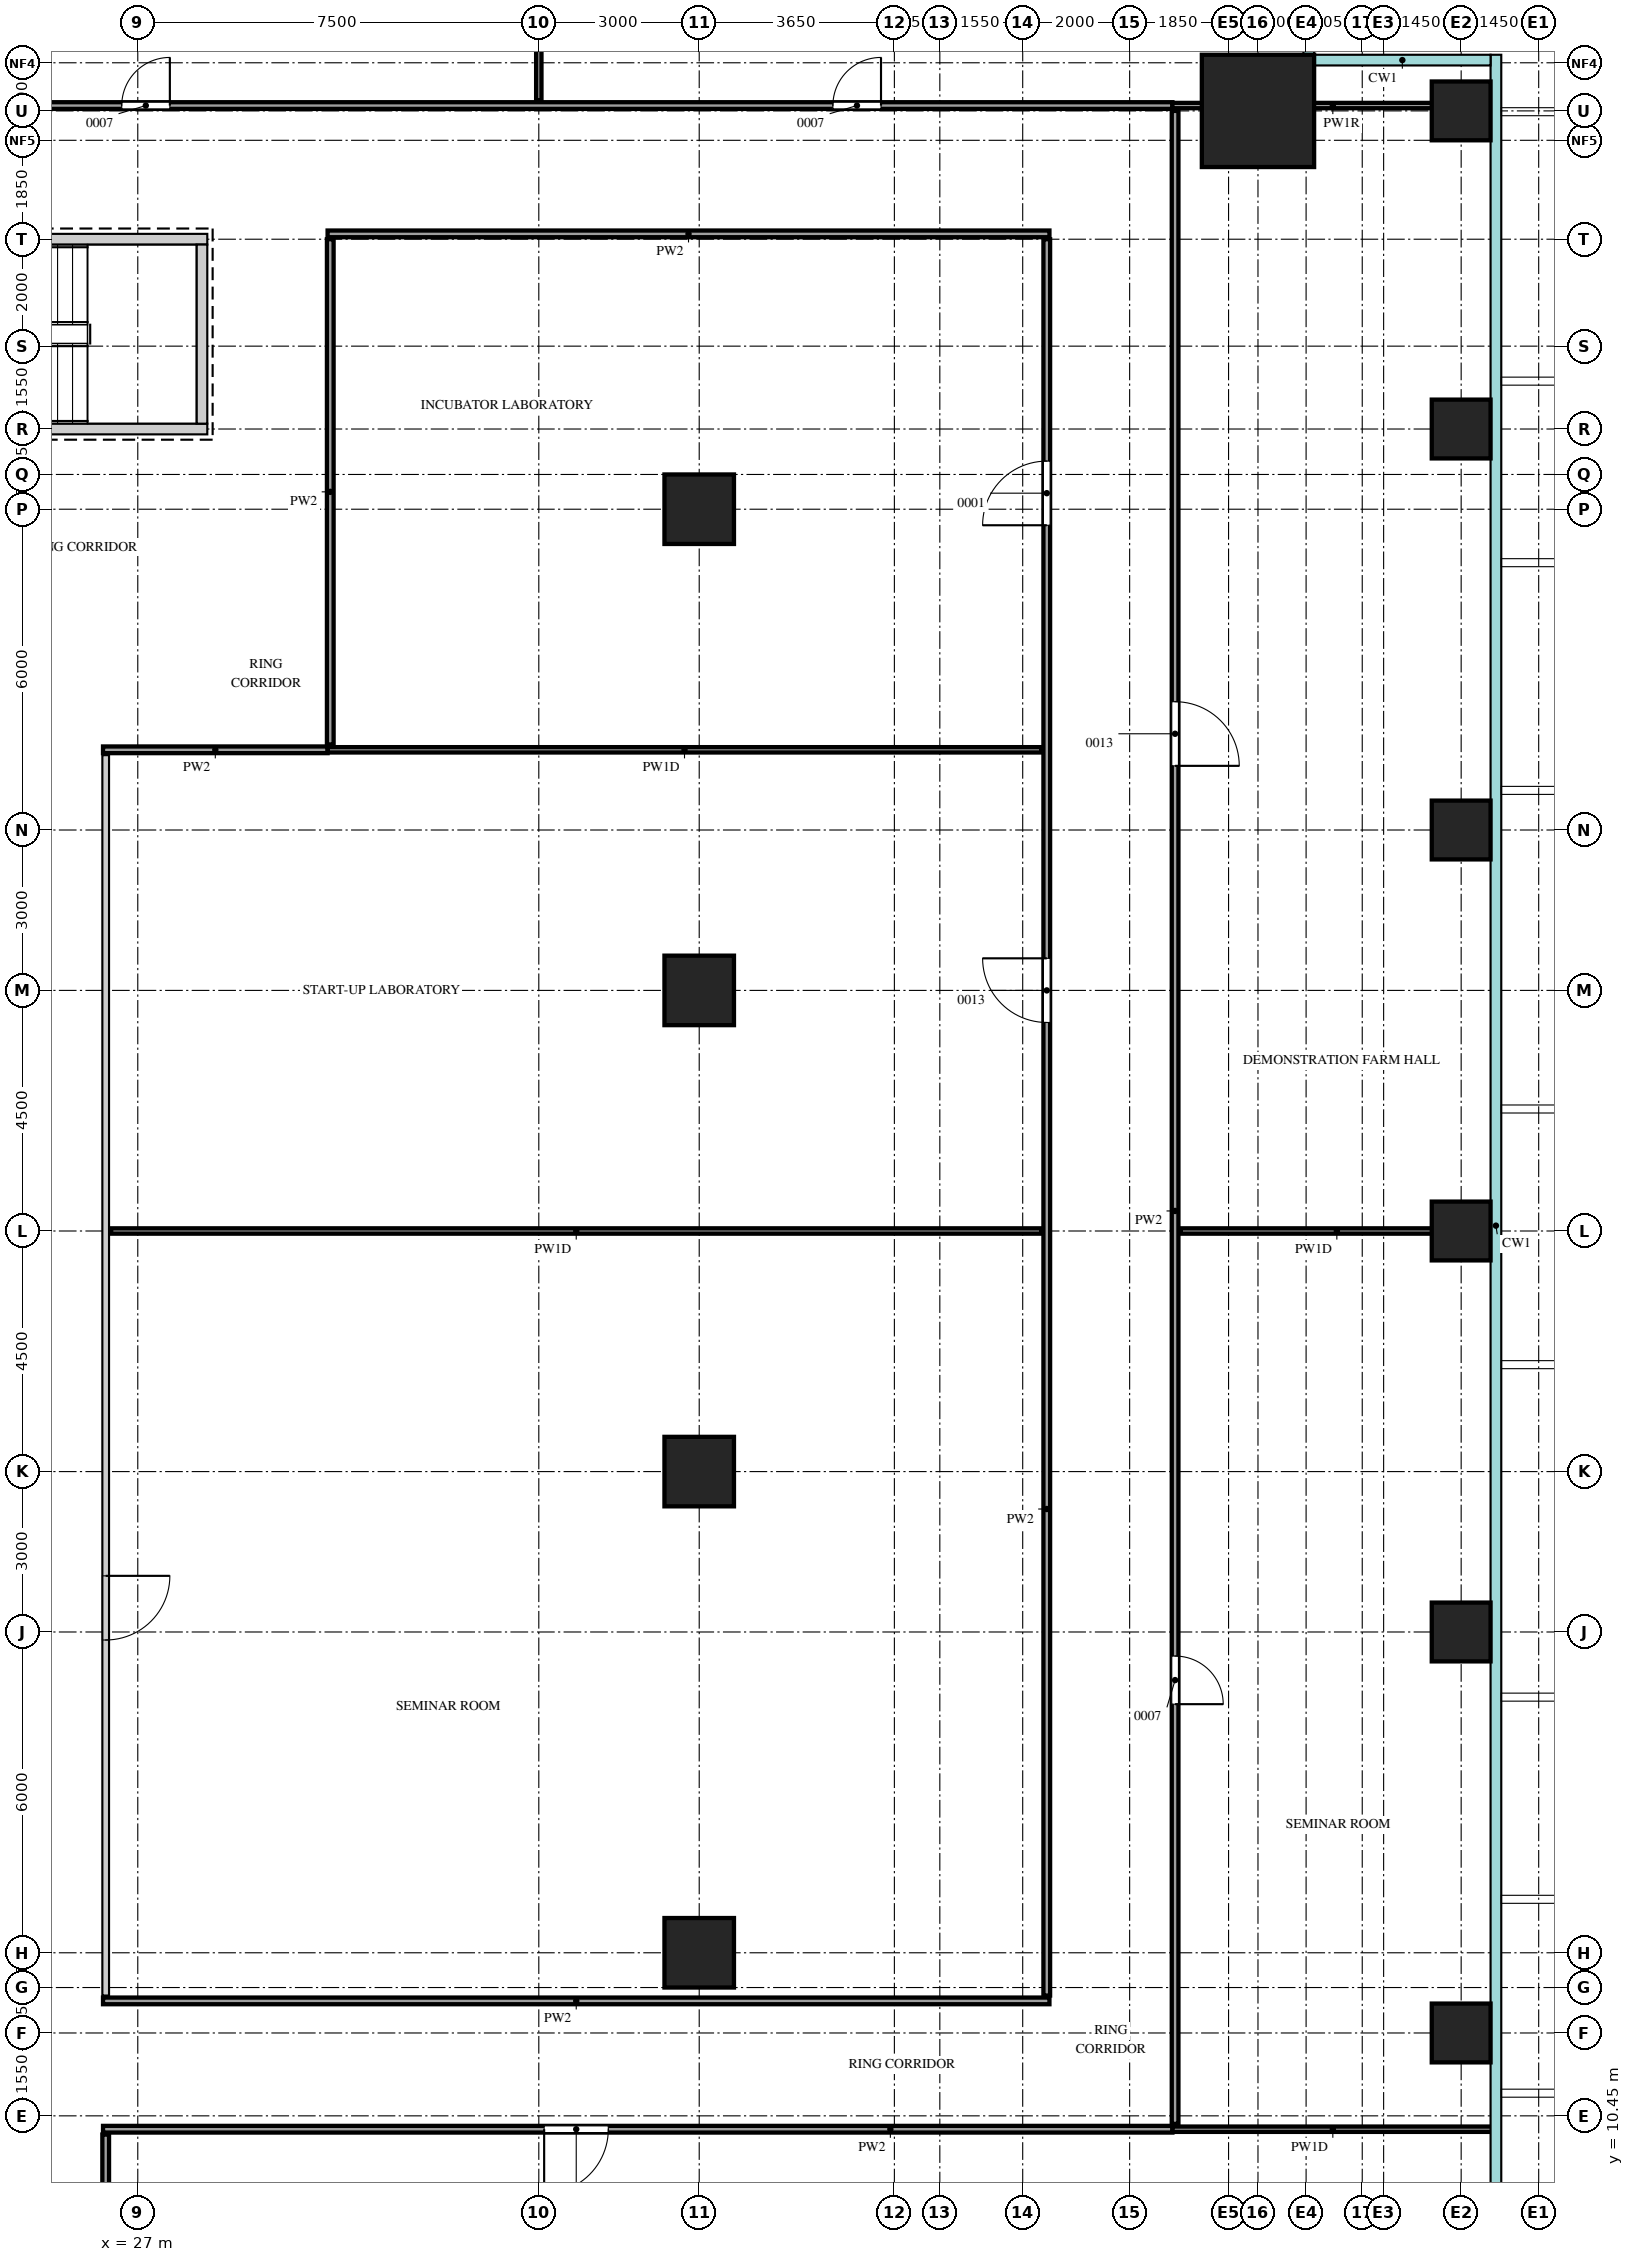
"""IFC4 building model, lengths in metres.
Left out: names, types, materials, properties, quantities, classifications, styles, units other than length and angle.
Written with IfcOpenShell. Run it as: python <this file> out.ifc"""

import sys

from ifc_helpers import new_model, si_unit, direction, frame, frame_2d, origin, origin_2d, place, context, subcontext, project, spatial, rectangle, extrude, source, transform, mapped, element, fill, save


model = new_model("IFC4")
c1 = context("Model", 3, precision=1e-05, world=origin(), true_north=direction((0.0, 1.0)))
c2 = subcontext(c1, "Body", "Model", "MODEL_VIEW")
j1 = project(units=[si_unit("LENGTHUNIT", "METRE"), si_unit("PLANEANGLEUNIT", "RADIAN")], contexts=[c1])
p1 = place(None, origin())
s1 = spatial("IfcSite", under=j1, at=p1, CompositionType="ELEMENT")
p2 = place(p1, origin())
s2 = spatial("IfcBuilding", under=s1, at=p2, CompositionType="ELEMENT")
p3 = place(p2, frame((0.0, 0.0, 154.3)))
s3 = spatial("IfcBuildingStorey", under=s2, at=p3, CompositionType="ELEMENT", Elevation=154.3)
m1 = source(origin(), c2, "Body", "SweptSolid", [
    extrude(rectangle(XDim=7.1, YDim=0.2, at=frame_2d((3.55, 0.0))), origin(), (0.0, 0.0, 1.0), 4.1),
])
p4 = place(p3, frame((21.2, 45.55, 0.0), z_axis=(0.0, 0.0, 1.0), x_axis=(1.0, 0.0, 0.0)))
e1 = element("IfcWall", 1, at=p4, inside=s3, PredefinedType="SHEAR", context=c2, shape_type="MappedRepresentation", body=[
    mapped(m1, transform((0.0, 0.0, 0.0))),
])
m2 = source(origin(), c2, "Body", "SweptSolid", [
    extrude(rectangle(XDim=1.2, YDim=2.1, at=frame_2d((0.6, 1.05))), frame((0.0, 0.11, 0.0), z_axis=(0.0, -1.0, 0.0), x_axis=(1.0, 0.0, 0.0)), (0.0, 0.0, 1.0), 0.22),
])
p5 = place(p4, frame((0.15, 0.0, 0.0)))
e2 = element("IfcOpeningElement", 2, at=p5, cuts=e1, PredefinedType="OPENING", context=c2, shape_type="MappedRepresentation", body=[
    mapped(m2, transform((0.0, 0.0, 0.0))),
])
p6 = place(p3, frame((21.2, 42.0, 0.0), z_axis=(0.0, 0.0, 1.0), x_axis=(1.0, 0.0, 0.0)))
e3 = element("IfcWall", 3, at=p6, inside=s3, PredefinedType="SHEAR", context=c2, shape_type="MappedRepresentation", body=[
    mapped(m1, transform((0.0, 0.0, 0.0))),
])
m3 = source(origin(), c2, "Body", "SweptSolid", [
    extrude(rectangle(XDim=3.35, YDim=0.2, at=frame_2d((1.675, 0.0))), origin(), (0.0, 0.0, 1.0), 4.1),
])
p7 = place(p3, frame((28.2, 42.1, 0.0), z_axis=(0.0, 0.0, 1.0), x_axis=(0.0, 1.0, 0.0)))
e4 = element("IfcWall", 4, at=p7, inside=s3, PredefinedType="SHEAR", context=c2, shape_type="MappedRepresentation", body=[
    mapped(m3, transform((0.0, 0.0, 0.0))),
])
m4 = source(origin(), c2, "Body", "SweptSolid", [
    extrude(rectangle(XDim=2.1, YDim=2.1, at=origin_2d()), origin(), (0.0, 0.0, 1.0), 4.4),
])
p8 = place(p3, frame((47.95, 47.95, 0.0), z_axis=(0.0, 0.0, 1.0), x_axis=(1.0, 0.0, 0.0)))
e5 = element("IfcColumn", 5, at=p8, inside=s3, PredefinedType="COLUMN", context=c2, shape_type="MappedRepresentation", body=[
    mapped(m4, transform((0.0, 0.0, 0.0))),
])
m5 = source(origin(), c2, "Body", "SweptSolid", [
    extrude(rectangle(XDim=1.1, YDim=1.1, at=origin_2d()), origin(), (0.0, 0.0, 1.0), 4.4),
])
for number, where, z_axis, x_axis in (
    (6, (51.75, 12.0, 0.0), (0.0, 0.0, 1.0), (1.0, 0.0, 0.0)),
    (7, (51.75, 19.5, 0.0), (0.0, 0.0, 1.0), (1.0, 0.0, 0.0)),
    (8, (51.75, 27.0, 0.0), (0.0, 0.0, 1.0), (1.0, 0.0, 0.0)),
    (9, (51.75, 34.5, 0.0), (0.0, 0.0, 1.0), (1.0, 0.0, 0.0)),
    (10, (51.75, 42.0, 0.0), (0.0, 0.0, 1.0), (1.0, 0.0, 0.0)),
    (11, (51.75, 47.95, 0.0), (0.0, 0.0, 1.0), (1.0, 0.0, 0.0)),
):
    element("IfcColumn", number, at=place(p3, frame(where, z_axis=z_axis, x_axis=x_axis)), inside=s3, PredefinedType="COLUMN", context=c2, shape_type="MappedRepresentation", body=[
        mapped(m5, transform((0.0, 0.0, 0.0))),
    ])
m6 = source(origin(), c2, "Body", "SweptSolid", [
    extrude(rectangle(XDim=1.3, YDim=1.3, at=origin_2d()), origin(), (0.0, 0.0, 1.0), 4.4),
])
for number, where, z_axis, x_axis in (
    (12, (37.5, 13.5, 0.0), (0.0, 0.0, 1.0), (1.0, 0.0, 0.0)),
    (13, (37.5, 22.5, 0.0), (0.0, 0.0, 1.0), (1.0, 0.0, 0.0)),
    (14, (37.5, 31.5, 0.0), (0.0, 0.0, 1.0), (1.0, 0.0, 0.0)),
    (15, (37.5, 40.5, 0.0), (0.0, 0.0, 1.0), (1.0, 0.0, 0.0)),
):
    element("IfcColumn", number, at=place(p3, frame(where, z_axis=z_axis, x_axis=x_axis)), inside=s3, PredefinedType="COLUMN", context=c2, shape_type="MappedRepresentation", body=[
        mapped(m6, transform((0.0, 0.0, 0.0))),
    ])
m7 = source(origin(), c2, "Body", "SweptSolid", [
    extrude(rectangle(XDim=3.95, YDim=0.125, at=frame_2d((1.975, 0.0))), origin(), (0.0, 0.0, 1.0), 4.2),
])
p9 = place(p3, frame((26.4, 6.15, 0.0), z_axis=(0.0, 0.0, 1.0), x_axis=(0.0, 1.0, 0.0)))
e16 = element("IfcWall", 16, at=p9, inside=s3, PredefinedType="PARTITIONING", context=c2, shape_type="MappedRepresentation", body=[
    mapped(m7, transform((0.0, 0.0, 0.0))),
])
m8 = source(origin(), c2, "Body", "SweptSolid", [
    extrude(rectangle(XDim=20.0, YDim=0.125, at=frame_2d((10.0, 0.0))), origin(), (0.0, 0.0, 1.0), 4.2),
])
p10 = place(p3, frame((26.35, 10.2, 0.0), z_axis=(0.0, 0.0, 1.0), x_axis=(1.0, 0.0, 0.0)))
e17 = element("IfcWall", 17, at=p10, inside=s3, PredefinedType="PARTITIONING", context=c2, shape_type="MappedRepresentation", body=[
    mapped(m8, transform((0.0, 0.0, 0.0))),
])
m9 = source(origin(), c2, "Body", "SweptSolid", [
    extrude(rectangle(XDim=1.2, YDim=2.1, at=frame_2d((0.6, 1.05))), frame((0.0, 0.073, 0.0), z_axis=(0.0, -1.0, 0.0), x_axis=(1.0, 0.0, 0.0)), (0.0, 0.0, 1.0), 0.145),
])
p11 = place(p10, frame((8.25, 0.0, 0.0)))
e18 = element("IfcOpeningElement", 18, at=p11, cuts=e17, PredefinedType="OPENING", context=c2, shape_type="MappedRepresentation", body=[
    mapped(m9, transform((0.0, 0.0, 0.0))),
])
m10 = source(origin(), c2, "Body", "SweptSolid", [
    extrude(rectangle(XDim=6.0, YDim=0.1, at=frame_2d((3.0, 0.0))), origin(), (0.0, 0.0, 1.0), 4.2),
])
p12 = place(p3, frame((46.35, 10.2, 0.0), z_axis=(0.0, 0.0, 1.0), x_axis=(1.0, 0.0, 0.0)))
e19 = element("IfcWall", 19, at=p12, inside=s3, PredefinedType="PARTITIONING", context=c2, shape_type="MappedRepresentation", body=[
    mapped(m10, transform((0.0, 0.0, 0.0))),
])
m11 = source(origin(), c2, "Body", "SweptSolid", [
    extrude(rectangle(XDim=37.65, YDim=0.125, at=frame_2d((18.825, 0.0))), origin(), (0.0, 0.0, 1.0), 4.2),
])
p13 = place(p3, frame((46.4, 10.3, 0.0), z_axis=(0.0, 0.0, 1.0), x_axis=(0.0, 1.0, 0.0)))
e20 = element("IfcWall", 20, at=p13, inside=s3, PredefinedType="PARTITIONING", context=c2, shape_type="MappedRepresentation", body=[
    mapped(m11, transform((0.0, 0.0, 0.0))),
])
m12 = source(origin(), c2, "Body", "SweptSolid", [
    extrude(rectangle(XDim=0.9, YDim=2.1, at=frame_2d((0.45, 1.05))), frame((0.0, 0.073, 0.0), z_axis=(0.0, -1.0, 0.0), x_axis=(1.0, 0.0, 0.0)), (0.0, 0.0, 1.0), 0.145),
])
p14 = place(p13, frame((7.85, 0.0, 0.0)))
e21 = element("IfcOpeningElement", 21, at=p14, cuts=e20, PredefinedType="OPENING", context=c2, shape_type="MappedRepresentation", body=[
    mapped(m12, transform((0.0, 0.0, 0.0))),
])
p15 = place(p13, frame((25.4, 0.0, 0.0)))
e22 = element("IfcOpeningElement", 22, at=p15, cuts=e20, PredefinedType="OPENING", context=c2, shape_type="MappedRepresentation", body=[
    mapped(m9, transform((0.0, 0.0, 0.0))),
])
m13 = source(origin(), c2, "Body", "SweptSolid", [
    extrude(rectangle(XDim=17.7, YDim=0.125, at=frame_2d((8.85, 0.0))), origin(), (0.0, 0.0, 1.0), 4.2),
])
p16 = place(p3, frame((26.35, 12.6, 0.0), z_axis=(0.0, 0.0, 1.0), x_axis=(1.0, 0.0, 0.0)))
e23 = element("IfcWall", 23, at=p16, inside=s3, PredefinedType="PARTITIONING", context=c2, shape_type="MappedRepresentation", body=[
    mapped(m13, transform((0.0, 0.0, 0.0))),
])
m14 = source(origin(), c2, "Body", "SweptSolid", [
    extrude(rectangle(XDim=23.2, YDim=0.125, at=frame_2d((11.6, 0.0))), origin(), (0.0, 0.0, 1.0), 4.2),
])
p17 = place(p3, frame((26.4, 12.7, 0.0), z_axis=(0.0, 0.0, 1.0), x_axis=(0.0, 1.0, 0.0)))
e24 = element("IfcWall", 24, at=p17, inside=s3, PredefinedType="PARTITIONING", context=c2, shape_type="MappedRepresentation", body=[
    mapped(m14, transform((0.0, 0.0, 0.0))),
])
p18 = place(p17, frame((6.65, 0.0, 0.0)))
e25 = element("IfcOpeningElement", 25, at=p18, cuts=e24, PredefinedType="OPENING", context=c2, shape_type="MappedRepresentation", body=[
    mapped(m9, transform((0.0, 0.0, 0.0))),
])
m15 = source(origin(), c2, "Body", "SweptSolid", [
    extrude(rectangle(XDim=32.85, YDim=0.125, at=frame_2d((16.425, 0.0))), origin(), (0.0, 0.0, 1.0), 4.2),
])
p19 = place(p3, frame((44.0, 12.7, 0.0), z_axis=(0.0, 0.0, 1.0), x_axis=(0.0, 1.0, 0.0)))
e26 = element("IfcWall", 26, at=p19, inside=s3, PredefinedType="PARTITIONING", context=c2, shape_type="MappedRepresentation", body=[
    mapped(m15, transform((0.0, 0.0, 0.0))),
])
p20 = place(p19, frame((18.2, 0.0, 0.0)))
e27 = element("IfcOpeningElement", 27, at=p20, cuts=e26, PredefinedType="OPENING", context=c2, shape_type="MappedRepresentation", body=[
    mapped(m9, transform((0.0, 0.0, 0.0))),
])
p21 = place(p19, frame((27.5, 0.0, 0.0)))
e28 = element("IfcOpeningElement", 28, at=p21, cuts=e26, PredefinedType="OPENING", context=c2, shape_type="MappedRepresentation", body=[
    mapped(m9, transform((0.0, 0.0, 0.0))),
])
m16 = source(origin(), c2, "Body", "SweptSolid", [
    extrude(rectangle(XDim=17.4, YDim=0.1, at=frame_2d((8.7, 0.0))), origin(), (0.0, 0.0, 1.0), 4.2),
])
p22 = place(p3, frame((26.5, 27.0, 0.0), z_axis=(0.0, 0.0, 1.0), x_axis=(1.0, 0.0, 0.0)))
e29 = element("IfcWall", 29, at=p22, inside=s3, PredefinedType="PARTITIONING", context=c2, shape_type="MappedRepresentation", body=[
    mapped(m16, transform((0.0, 0.0, 0.0))),
])
m17 = source(origin(), c2, "Body", "SweptSolid", [
    extrude(rectangle(XDim=5.85, YDim=0.1, at=frame_2d((2.925, 0.0))), origin(), (0.0, 0.0, 1.0), 4.2),
])
p23 = place(p3, frame((46.5, 27.0, 0.0), z_axis=(0.0, 0.0, 1.0), x_axis=(1.0, 0.0, 0.0)))
e30 = element("IfcWall", 30, at=p23, inside=s3, PredefinedType="PARTITIONING", context=c2, shape_type="MappedRepresentation", body=[
    mapped(m17, transform((0.0, 0.0, 0.0))),
])
m18 = source(origin(), c2, "Body", "SweptSolid", [
    extrude(rectangle(XDim=4.2, YDim=0.125, at=frame_2d((2.1, 0.0))), origin(), (0.0, 0.0, 1.0), 4.2),
])
p24 = place(p3, frame((26.35, 36.0, 0.0), z_axis=(0.0, 0.0, 1.0), x_axis=(1.0, 0.0, 0.0)))
e31 = element("IfcWall", 31, at=p24, inside=s3, PredefinedType="PARTITIONING", context=c2, shape_type="MappedRepresentation", body=[
    mapped(m18, transform((0.0, 0.0, 0.0))),
])
m19 = source(origin(), c2, "Body", "SweptSolid", [
    extrude(rectangle(XDim=13.35, YDim=0.1, at=frame_2d((6.675, 0.0))), origin(), (0.0, 0.0, 1.0), 4.2),
])
p25 = place(p3, frame((30.55, 36.0, 0.0), z_axis=(0.0, 0.0, 1.0), x_axis=(1.0, 0.0, 0.0)))
e32 = element("IfcWall", 32, at=p25, inside=s3, PredefinedType="PARTITIONING", context=c2, shape_type="MappedRepresentation", body=[
    mapped(m19, transform((0.0, 0.0, 0.0))),
])
m20 = source(origin(), c2, "Body", "SweptSolid", [
    extrude(rectangle(XDim=9.45, YDim=0.125, at=frame_2d((4.725, 0.0))), origin(), (0.0, 0.0, 1.0), 4.2),
])
p26 = place(p3, frame((30.6, 36.1, 0.0), z_axis=(0.0, 0.0, 1.0), x_axis=(0.0, 1.0, 0.0)))
e33 = element("IfcWall", 33, at=p26, inside=s3, PredefinedType="PARTITIONING", context=c2, shape_type="MappedRepresentation", body=[
    mapped(m20, transform((0.0, 0.0, 0.0))),
])
m21 = source(origin(), c2, "Body", "SweptSolid", [
    extrude(rectangle(XDim=13.5, YDim=0.125, at=frame_2d((6.75, 0.0))), origin(), (0.0, 0.0, 1.0), 4.2),
])
p27 = place(p3, frame((30.55, 45.65, 0.0), z_axis=(0.0, 0.0, 1.0), x_axis=(1.0, 0.0, 0.0)))
e34 = element("IfcWall", 34, at=p27, inside=s3, PredefinedType="PARTITIONING", context=c2, shape_type="MappedRepresentation", body=[
    mapped(m21, transform((0.0, 0.0, 0.0))),
])
m22 = source(origin(), c2, "Body", "SweptSolid", [
    extrude(rectangle(XDim=42.2, YDim=0.125, at=frame_2d((21.1, 0.0))), origin(), (0.0, 0.0, 1.0), 3.4),
])
p28 = place(p3, frame((4.15, 48.05, 0.0), z_axis=(0.0, 0.0, 1.0), x_axis=(1.0, 0.0, 0.0)))
e35 = element("IfcWall", 35, at=p28, inside=s3, PredefinedType="PARTITIONING", context=c2, shape_type="MappedRepresentation", body=[
    mapped(m22, transform((0.0, 0.0, 0.0))),
])
p29 = place(p28, frame((7.25, 0.0, 0.0)))
e36 = element("IfcOpeningElement", 36, at=p29, cuts=e35, PredefinedType="OPENING", context=c2, shape_type="MappedRepresentation", body=[
    mapped(m12, transform((0.0, 0.0, 0.0))),
])
p30 = place(p28, frame((22.55, 0.0, 0.0)))
e37 = element("IfcOpeningElement", 37, at=p30, cuts=e35, PredefinedType="OPENING", context=c2, shape_type="MappedRepresentation", body=[
    mapped(m12, transform((0.0, 0.0, 0.0))),
])
p31 = place(p28, frame((35.85, 0.0, 0.0)))
e38 = element("IfcOpeningElement", 38, at=p31, cuts=e35, PredefinedType="OPENING", context=c2, shape_type="MappedRepresentation", body=[
    mapped(m12, transform((0.0, 0.0, 0.0))),
])
m23 = source(origin(), c2, "Body", "SweptSolid", [
    extrude(rectangle(XDim=6.0, YDim=0.1, at=frame_2d((3.0, 0.0))), origin(), (0.0, 0.0, 1.0), 3.4),
])
p32 = place(p3, frame((46.35, 48.05, 0.0), z_axis=(0.0, 0.0, 1.0), x_axis=(1.0, 0.0, 0.0)))
e39 = element("IfcWall", 39, at=p32, inside=s3, PredefinedType="PARTITIONING", context=c2, shape_type="MappedRepresentation", body=[
    mapped(m23, transform((0.0, 0.0, 0.0))),
])
m24 = source(origin(), c2, "Body", "SweptSolid", [
    extrude(rectangle(XDim=4.2, YDim=0.1, at=frame_2d((2.1, 0.0))), origin(), (0.0, 0.0, 1.0), 3.45),
])
p33 = place(p3, frame((34.5, 48.15, 0.0), z_axis=(0.0, 0.0, 1.0), x_axis=(0.0, 1.0, 0.0)))
e40 = element("IfcWall", 40, at=p33, inside=s3, PredefinedType="PARTITIONING", context=c2, shape_type="MappedRepresentation", body=[
    mapped(m24, transform((0.0, 0.0, 0.0))),
])
m25 = source(origin(), c2, "Body", "SweptSolid", [
    extrude(rectangle(XDim=1.2, YDim=2.1, at=frame_2d((0.6, 1.05))), frame((0.0, 0.025, 0.0), z_axis=(0.0, -1.0, 0.0), x_axis=(1.0, 0.0, 0.0)), (0.0, 0.0, 1.0), 0.05),
])
p34 = place(p11, origin())
e41 = element("IfcDoor", 41, at=p34, inside=s3, OperationType="SINGLE_SWING_LEFT", PredefinedType="DOOR", context=c2, shape_type="MappedRepresentation", body=[
    mapped(m25, transform((0.0, 0.0, 0.0))),
])
fill(e18, e41)
p35 = place(p18, origin())
e42 = element("IfcDoor", 42, at=p35, inside=s3, OperationType="SINGLE_SWING_RIGHT", PredefinedType="DOOR", context=c2, shape_type="MappedRepresentation", body=[
    mapped(m25, transform((0.0, 0.0, 0.0))),
])
fill(e25, e42)
p36 = place(p20, origin())
e43 = element("IfcDoor", 43, at=p36, inside=s3, OperationType="SINGLE_SWING_LEFT", PredefinedType="DOOR", context=c2, shape_type="MappedRepresentation", body=[
    mapped(m25, transform((0.0, 0.0, 0.0))),
])
fill(e27, e43)
p37 = place(p21, origin())
e44 = element("IfcDoor", 44, at=p37, inside=s3, OperationType="SINGLE_SWING_RIGHT", PredefinedType="DOOR", context=c2, shape_type="MappedRepresentation", body=[
    mapped(m25, transform((0.0, 0.0, 0.0))),
])
fill(e28, e44)
m26 = source(origin(), c2, "Body", "SweptSolid", [
    extrude(rectangle(XDim=0.9, YDim=2.1, at=frame_2d((0.45, 1.05))), frame((0.0, 0.025, 0.0), z_axis=(0.0, -1.0, 0.0), x_axis=(1.0, 0.0, 0.0)), (0.0, 0.0, 1.0), 0.05),
])
p38 = place(p14, origin())
e45 = element("IfcDoor", 45, at=p38, inside=s3, OperationType="SINGLE_SWING_LEFT", PredefinedType="DOOR", context=c2, shape_type="MappedRepresentation", body=[
    mapped(m26, transform((0.0, 0.0, 0.0))),
])
fill(e21, e45)
p39 = place(p15, origin())
e46 = element("IfcDoor", 46, at=p39, inside=s3, OperationType="SINGLE_SWING_LEFT", PredefinedType="DOOR", context=c2, shape_type="MappedRepresentation", body=[
    mapped(m25, transform((0.0, 0.0, 0.0))),
])
fill(e22, e46)
p40 = place(p30, origin())
e47 = element("IfcDoor", 47, at=p40, inside=s3, OperationType="SINGLE_SWING_LEFT", PredefinedType="DOOR", context=c2, shape_type="MappedRepresentation", body=[
    mapped(m26, transform((0.0, 0.0, 0.0))),
])
fill(e37, e47)
p41 = place(p31, origin())
e48 = element("IfcDoor", 48, at=p41, inside=s3, OperationType="SINGLE_SWING_LEFT", PredefinedType="DOOR", context=c2, shape_type="MappedRepresentation", body=[
    mapped(m26, transform((0.0, 0.0, 0.0))),
])
fill(e38, e48)
save(model, sys.argv[1])
